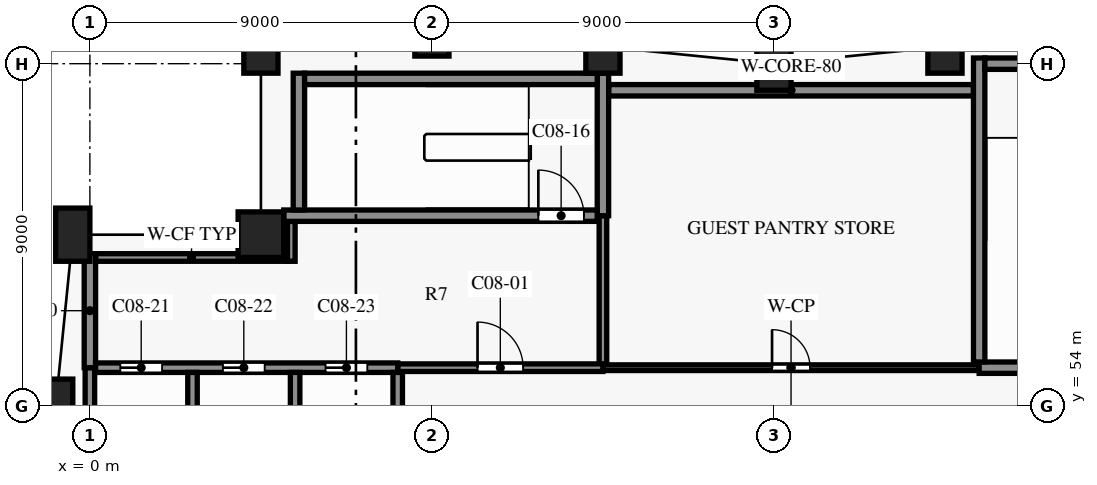
"""IFC4 building model, lengths in metres.
Left out: names, types, materials, properties, quantities, classifications, styles, units other than length and angle.
Written with IfcOpenShell. Run it as: python <this file> out.ifc"""

import sys

from ifc_helpers import new_model, si_unit, direction, frame, frame_2d, origin, origin_2d, place, context, subcontext, project, spatial, rectangle, extrude, element, fill, save


model = new_model("IFC4")
c1 = context("Model", 3, precision=1e-05, world=origin(), true_north=direction((0.0, 1.0)))
c2 = subcontext(c1, "Body", "Model", "MODEL_VIEW")
j1 = project(units=[si_unit("LENGTHUNIT", "METRE"), si_unit("PLANEANGLEUNIT", "RADIAN")], contexts=[c1])
p1 = place(None, origin())
s1 = spatial("IfcSite", under=j1, at=p1, CompositionType="ELEMENT")
p2 = place(p1, origin())
s2 = spatial("IfcBuilding", under=s1, at=p2, CompositionType="ELEMENT")
p3 = place(p2, frame((0.0, 0.0, 37.5)))
s3 = spatial("IfcBuildingStorey", under=s2, at=p3, CompositionType="ELEMENT", Elevation=37.5)
for number, where, z_axis, x_axis in (
    (1, (22.5, 63.45, 0.0), (0.0, 0.0, 1.0), (-0.995, -0.1, 0.0)),
    (2, (18.0, 63.0, 0.0), (0.0, 0.0, 1.0), (-1.0, 0.0, 0.0)),
    (3, (13.5, 63.45, 0.0), (0.0, 0.0, 1.0), (-0.995, 0.1, 0.0)),
    (4, (9.0, 63.9, 0.0), (0.0, 0.0, 1.0), (-1.0, 0.0, 0.0)),
    (5, (4.5, 63.45, 0.0), (0.0, 0.0, 1.0), (-0.995, -0.1, 0.0)),
    (6, (-0.45, 58.5, 0.0), (0.0, 0.0, 1.0), (-0.1, -0.995, 0.0)),
    (7, (-0.9, 54.0, 0.0), (0.0, 0.0, 1.0), (0.0, -1.0, 0.0)),
):
    element("IfcColumn", number, at=place(p3, frame(where, z_axis=z_axis, x_axis=x_axis)), inside=s3, PredefinedType="COLUMN", context=c2, shape_type="SweptSolid", body=[
        extrude(rectangle(XDim=0.9, YDim=1.4, at=origin_2d()), origin(), (0.0, 0.0, 1.0), 3.6),
    ])
p4 = place(p3, frame((4.5, 58.5, 0.0), z_axis=(0.0, 0.0, 1.0), x_axis=(1.0, 0.0, 0.0)))
e8 = element("IfcColumn", 8, at=p4, inside=s3, PredefinedType="COLUMN", context=c2, shape_type="SweptSolid", body=[
    extrude(rectangle(XDim=1.2, YDim=1.2, at=origin_2d()), origin(), (0.0, 0.0, 1.0), 3.6),
])
p5 = place(p3, frame((8.1, 55.0, 0.0), z_axis=(0.0, 0.0, 1.0), x_axis=(1.0, 0.0, 0.0)))
e9 = element("IfcWall", 9, at=p5, inside=s3, PredefinedType="PARTITIONING", context=c2, shape_type="SweptSolid", body=[
    extrude(rectangle(XDim=5.4, YDim=0.2, at=frame_2d((2.7, 0.0))), origin(), (0.0, 0.0, 1.0), 3.3),
])
p6 = place(p5, frame((2.1, 0.0, 0.0)))
e10 = element("IfcOpeningElement", 10, at=p6, cuts=e9, PredefinedType="OPENING", context=c2, shape_type="SweptSolid", body=[
    extrude(rectangle(XDim=1.2, YDim=2.2, at=frame_2d((0.6, 1.1))), frame((0.0, 0.11, 0.0), z_axis=(0.0, -1.0, 0.0), x_axis=(1.0, 0.0, 0.0)), (0.0, 0.0, 1.0), 0.22),
])
p7 = place(p3, frame((13.5, 55.0, 0.0), z_axis=(0.0, 0.0, 1.0), x_axis=(1.0, 0.0, 0.0)))
e11 = element("IfcWall", 11, at=p7, inside=s3, PredefinedType="PARTITIONING", context=c2, shape_type="SweptSolid", body=[
    extrude(rectangle(XDim=9.9, YDim=0.15, at=frame_2d((4.95, 0.0))), origin(), (0.0, 0.0, 1.0), 3.3),
])
p8 = place(p7, frame((4.45, 0.0, 0.0)))
e12 = element("IfcOpeningElement", 12, at=p8, cuts=e11, PredefinedType="OPENING", context=c2, shape_type="SweptSolid", body=[
    extrude(rectangle(XDim=1.0, YDim=2.1, at=frame_2d((0.5, 1.05))), frame((0.0, 0.085, 0.0), z_axis=(0.0, -1.0, 0.0), x_axis=(1.0, 0.0, 0.0)), (0.0, 0.0, 1.0), 0.17),
])
p9 = place(p3, frame((0.15, 55.0, 0.0), z_axis=(0.0, 0.0, 1.0), x_axis=(1.0, 0.0, 0.0)))
e13 = element("IfcWall", 13, at=p9, inside=s3, PredefinedType="SHEAR", context=c2, shape_type="SweptSolid", body=[
    extrude(rectangle(XDim=7.95, YDim=0.25, at=frame_2d((3.975, 0.0))), origin(), (0.0, 0.0, 1.0), 3.3),
])
p10 = place(p9, frame((0.65, 0.0, 0.0)))
e14 = element("IfcOpeningElement", 14, at=p10, cuts=e13, PredefinedType="OPENING", context=c2, shape_type="SweptSolid", body=[
    extrude(rectangle(XDim=1.1, YDim=2.1, at=frame_2d((0.55, 1.05))), frame((0.0, 0.135, 0.0), z_axis=(0.0, -1.0, 0.0), x_axis=(1.0, 0.0, 0.0)), (0.0, 0.0, 1.0), 0.27),
])
p11 = place(p9, frame((3.35, 0.0, 0.0)))
e15 = element("IfcOpeningElement", 15, at=p11, cuts=e13, PredefinedType="OPENING", context=c2, shape_type="SweptSolid", body=[
    extrude(rectangle(XDim=1.1, YDim=2.1, at=frame_2d((0.55, 1.05))), frame((0.0, 0.135, 0.0), z_axis=(0.0, -1.0, 0.0), x_axis=(1.0, 0.0, 0.0)), (0.0, 0.0, 1.0), 0.27),
])
p12 = place(p9, frame((6.05, 0.0, 0.0)))
e16 = element("IfcOpeningElement", 16, at=p12, cuts=e13, PredefinedType="OPENING", context=c2, shape_type="SweptSolid", body=[
    extrude(rectangle(XDim=1.1, YDim=2.1, at=frame_2d((0.55, 1.05))), frame((0.0, 0.135, 0.0), z_axis=(0.0, -1.0, 0.0), x_axis=(1.0, 0.0, 0.0)), (0.0, 0.0, 1.0), 0.27),
])
p13 = place(p3, frame((23.4, 55.0, 0.0), z_axis=(0.0, 0.0, 1.0), x_axis=(1.0, 0.0, 0.0)))
e17 = element("IfcWall", 17, at=p13, inside=s3, PredefinedType="SHEAR", context=c2, shape_type="SweptSolid", body=[
    extrude(rectangle(XDim=3.45, YDim=0.3, at=frame_2d((1.725, 0.0))), origin(), (0.0, 0.0, 1.0), 3.3),
])
p14 = place(p3, frame((0.15, 57.9, 0.0), z_axis=(0.0, 0.0, 1.0), x_axis=(1.0, 0.0, 0.0)))
e18 = element("IfcWall", 18, at=p14, inside=s3, PredefinedType="PARTITIONING", context=c2, shape_type="SweptSolid", body=[
    extrude(rectangle(XDim=5.05, YDim=0.2, at=frame_2d((2.525, 0.0))), origin(), (0.0, 0.0, 1.0), 3.3),
])
p15 = place(p3, frame((5.1, 59.0, 0.0), z_axis=(0.0, 0.0, 1.0), x_axis=(1.0, 0.0, 0.0)))
e19 = element("IfcWall", 19, at=p15, inside=s3, PredefinedType="SHEAR", context=c2, shape_type="SweptSolid", body=[
    extrude(rectangle(XDim=8.25, YDim=0.3, at=frame_2d((4.125, 0.0))), origin(), (0.0, 0.0, 1.0), 3.3),
])
p16 = place(p15, frame((6.7, 0.0, 0.0)))
e20 = element("IfcOpeningElement", 20, at=p16, cuts=e19, PredefinedType="OPENING", context=c2, shape_type="SweptSolid", body=[
    extrude(rectangle(XDim=1.2, YDim=2.2, at=frame_2d((0.6, 1.1))), frame((0.0, 0.16, 0.0), z_axis=(0.0, -1.0, 0.0), x_axis=(1.0, 0.0, 0.0)), (0.0, 0.0, 1.0), 0.32),
])
p17 = place(p3, frame((13.65, 62.3, 0.0), z_axis=(0.0, 0.0, 1.0), x_axis=(1.0, 0.0, 0.0)))
e21 = element("IfcWall", 21, at=p17, inside=s3, PredefinedType="SHEAR", context=c2, shape_type="SweptSolid", body=[
    extrude(rectangle(XDim=9.6, YDim=0.3, at=frame_2d((4.8, 0.0))), origin(), (0.0, 0.0, 1.0), 3.3),
])
p18 = place(p3, frame((5.65, 62.6, 0.0), z_axis=(0.0, 0.0, 1.0), x_axis=(1.0, 0.0, 0.0)))
e22 = element("IfcWall", 22, at=p18, inside=s3, PredefinedType="SHEAR", context=c2, shape_type="SweptSolid", body=[
    extrude(rectangle(XDim=7.7, YDim=0.3, at=frame_2d((3.85, 0.0))), origin(), (0.0, 0.0, 1.0), 3.3),
])
p19 = place(p3, frame((23.55, 63.0, 0.0), z_axis=(0.0, 0.0, 1.0), x_axis=(1.0, 0.0, 0.0)))
e23 = element("IfcWall", 23, at=p19, inside=s3, PredefinedType="SHEAR", context=c2, shape_type="SweptSolid", body=[
    extrude(rectangle(XDim=3.3, YDim=0.3, at=frame_2d((1.65, 0.0))), origin(), (0.0, 0.0, 1.0), 3.3),
])
p20 = place(p3, frame((0.0, 55.0, 0.0), z_axis=(0.0, 0.0, 1.0), x_axis=(0.0, 1.0, 0.0)))
e24 = element("IfcWall", 24, at=p20, inside=s3, PredefinedType="SHEAR", context=c2, shape_type="SweptSolid", body=[
    extrude(rectangle(XDim=3.0, YDim=0.3, at=frame_2d((1.5, 0.0))), origin(), (0.0, 0.0, 1.0), 3.3),
])
p21 = place(p3, frame((0.0, 51.65, 0.0), z_axis=(0.0, 0.0, 1.0), x_axis=(0.0, 1.0, 0.0)))
e25 = element("IfcWall", 25, at=p21, inside=s3, PredefinedType="SHEAR", context=c2, shape_type="SweptSolid", body=[
    extrude(rectangle(XDim=3.35, YDim=0.25, at=frame_2d((1.675, 0.0))), origin(), (0.0, 0.0, 1.0), 3.3),
])
p22 = place(p3, frame((2.7, 51.925, 0.0), z_axis=(0.0, 0.0, 1.0), x_axis=(0.0, 1.0, 0.0)))
e26 = element("IfcWall", 26, at=p22, inside=s3, PredefinedType="SHEAR", context=c2, shape_type="SweptSolid", body=[
    extrude(rectangle(XDim=2.95, YDim=0.25, at=frame_2d((1.475, 0.0))), origin(), (0.0, 0.0, 1.0), 3.3),
])
p23 = place(p3, frame((5.3, 57.8, 0.0), z_axis=(0.0, 0.0, 1.0), x_axis=(0.0, 1.0, 0.0)))
e27 = element("IfcWall", 27, at=p23, inside=s3, PredefinedType="PARTITIONING", context=c2, shape_type="SweptSolid", body=[
    extrude(rectangle(XDim=1.05, YDim=0.2, at=frame_2d((0.525, 0.0))), origin(), (0.0, 0.0, 1.0), 3.3),
])
p24 = place(p3, frame((5.4, 51.925, 0.0), z_axis=(0.0, 0.0, 1.0), x_axis=(0.0, 1.0, 0.0)))
e28 = element("IfcWall", 28, at=p24, inside=s3, PredefinedType="SHEAR", context=c2, shape_type="SweptSolid", body=[
    extrude(rectangle(XDim=2.95, YDim=0.25, at=frame_2d((1.475, 0.0))), origin(), (0.0, 0.0, 1.0), 3.3),
])
p25 = place(p3, frame((5.5, 59.15, 0.0), z_axis=(0.0, 0.0, 1.0), x_axis=(0.0, 1.0, 0.0)))
e29 = element("IfcWall", 29, at=p25, inside=s3, PredefinedType="SHEAR", context=c2, shape_type="SweptSolid", body=[
    extrude(rectangle(XDim=3.6, YDim=0.3, at=frame_2d((1.8, 0.0))), origin(), (0.0, 0.0, 1.0), 3.3),
])
p26 = place(p3, frame((8.1, 51.925, 0.0), z_axis=(0.0, 0.0, 1.0), x_axis=(0.0, 1.0, 0.0)))
e30 = element("IfcWall", 30, at=p26, inside=s3, PredefinedType="SHEAR", context=c2, shape_type="SweptSolid", body=[
    extrude(rectangle(XDim=2.95, YDim=0.25, at=frame_2d((1.475, 0.0))), origin(), (0.0, 0.0, 1.0), 3.3),
])
p27 = place(p3, frame((13.5, 55.1, 0.0), z_axis=(0.0, 0.0, 1.0), x_axis=(0.0, 1.0, 0.0)))
e31 = element("IfcWall", 31, at=p27, inside=s3, PredefinedType="PARTITIONING", context=c2, shape_type="SweptSolid", body=[
    extrude(rectangle(XDim=3.9, YDim=0.2, at=frame_2d((1.95, 0.0))), origin(), (0.0, 0.0, 1.0), 3.3),
])
p28 = place(p3, frame((13.5, 59.0, 0.0), z_axis=(0.0, 0.0, 1.0), x_axis=(0.0, 1.0, 0.0)))
e32 = element("IfcWall", 32, at=p28, inside=s3, PredefinedType="SHEAR", context=c2, shape_type="SweptSolid", body=[
    extrude(rectangle(XDim=3.75, YDim=0.3, at=frame_2d((1.875, 0.0))), origin(), (0.0, 0.0, 1.0), 3.3),
])
p29 = place(p3, frame((23.4, 55.15, 0.0), z_axis=(0.0, 0.0, 1.0), x_axis=(0.0, 1.0, 0.0)))
e33 = element("IfcWall", 33, at=p29, inside=s3, PredefinedType="SHEAR", context=c2, shape_type="SweptSolid", body=[
    extrude(rectangle(XDim=8.0, YDim=0.3, at=frame_2d((4.0, 0.0))), origin(), (0.0, 0.0, 1.0), 3.3),
])
p30 = place(p6, origin())
e34 = element("IfcDoor", 34, at=p30, inside=s3, OperationType="SINGLE_SWING_RIGHT", PredefinedType="DOOR", context=c2, shape_type="SweptSolid", body=[
    extrude(rectangle(XDim=1.2, YDim=2.2, at=frame_2d((0.6, 1.1))), frame((0.0, 0.025, 0.0), z_axis=(0.0, -1.0, 0.0), x_axis=(1.0, 0.0, 0.0)), (0.0, 0.0, 1.0), 0.05),
])
fill(e10, e34)
p31 = place(p8, origin())
e35 = element("IfcDoor", 35, at=p31, inside=s3, OperationType="SINGLE_SWING_LEFT", PredefinedType="DOOR", context=c2, shape_type="SweptSolid", body=[
    extrude(rectangle(XDim=1.0, YDim=2.1, at=frame_2d((0.5, 1.05))), frame((0.0, 0.025, 0.0), z_axis=(0.0, -1.0, 0.0), x_axis=(1.0, 0.0, 0.0)), (0.0, 0.0, 1.0), 0.05),
])
fill(e12, e35)
p32 = place(p16, origin())
e36 = element("IfcDoor", 36, at=p32, inside=s3, OperationType="SINGLE_SWING_RIGHT", PredefinedType="DOOR", context=c2, shape_type="SweptSolid", body=[
    extrude(rectangle(XDim=1.2, YDim=2.2, at=frame_2d((0.6, 1.1))), frame((0.0, 0.025, 0.0), z_axis=(0.0, -1.0, 0.0), x_axis=(1.0, 0.0, 0.0)), (0.0, 0.0, 1.0), 0.05),
])
fill(e20, e36)
p33 = place(p10, origin())
e37 = element("IfcDoor", 37, at=p33, inside=s3, OperationType="DOUBLE_DOOR_SLIDING", PredefinedType="DOOR", context=c2, shape_type="SweptSolid", body=[
    extrude(rectangle(XDim=1.1, YDim=2.1, at=frame_2d((0.55, 1.05))), frame((0.0, 0.025, 0.0), z_axis=(0.0, -1.0, 0.0), x_axis=(1.0, 0.0, 0.0)), (0.0, 0.0, 1.0), 0.05),
])
fill(e14, e37)
p34 = place(p11, origin())
e38 = element("IfcDoor", 38, at=p34, inside=s3, OperationType="DOUBLE_DOOR_SLIDING", PredefinedType="DOOR", context=c2, shape_type="SweptSolid", body=[
    extrude(rectangle(XDim=1.1, YDim=2.1, at=frame_2d((0.55, 1.05))), frame((0.0, 0.025, 0.0), z_axis=(0.0, -1.0, 0.0), x_axis=(1.0, 0.0, 0.0)), (0.0, 0.0, 1.0), 0.05),
])
fill(e15, e38)
p35 = place(p12, origin())
e39 = element("IfcDoor", 39, at=p35, inside=s3, OperationType="DOUBLE_DOOR_SLIDING", PredefinedType="DOOR", context=c2, shape_type="SweptSolid", body=[
    extrude(rectangle(XDim=1.1, YDim=2.1, at=frame_2d((0.55, 1.05))), frame((0.0, 0.025, 0.0), z_axis=(0.0, -1.0, 0.0), x_axis=(1.0, 0.0, 0.0)), (0.0, 0.0, 1.0), 0.05),
])
fill(e16, e39)
save(model, sys.argv[1])
